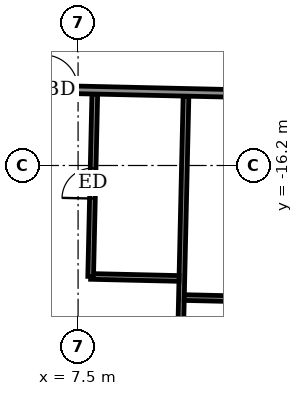
"""IFC4 building model, lengths in metres.
Left out: names, types, materials, properties, quantities, classifications, styles, units other than length and angle.
Written with IfcOpenShell. Run it as: python <this file> out.ifc"""

import sys

from ifc_helpers import new_model, si_unit, direction, frame, frame_2d, origin, place, context, subcontext, project, spatial, rectangle, extrude, element, fill, save


model = new_model("IFC4")
c1 = context("Model", 3, precision=1e-05, world=origin(), true_north=direction((0.0, 1.0)))
c2 = subcontext(c1, "Body", "Model", "MODEL_VIEW")
j1 = project(units=[si_unit("LENGTHUNIT", "METRE"), si_unit("PLANEANGLEUNIT", "RADIAN")], contexts=[c1])
p1 = place(None, origin())
s1 = spatial("IfcSite", under=j1, at=p1, CompositionType="ELEMENT")
p2 = place(p1, origin())
s2 = spatial("IfcBuilding", under=s1, at=p2, CompositionType="ELEMENT")
p3 = place(p2, frame((0.0, 0.0, 306.1)))
s3 = spatial("IfcBuildingStorey", under=s2, at=p3, CompositionType="ELEMENT", Elevation=306.1)
p4 = place(p3, frame((10.08, -25.822, 0.0), z_axis=(0.0, 0.0, 1.0), x_axis=(0.022708327922, 0.999742132674, 0.0)))
e1 = element("IfcWall", 1, at=p4, inside=s3, PredefinedType="PARTITIONING", context=c2, shape_type="SweptSolid", body=[
    extrude(rectangle(XDim=11.45, YDim=0.15, at=frame_2d((5.725, 0.0))), origin(), (0.0, 0.0, 1.0), 2.5),
])
for number, where, z_axis, x_axis in (
    (2, (10.294, -19.675, 0.0), (0.0, 0.0, 1.0), (1.0, -0.023, 0.0)),
    (3, (7.831, -19.119, 0.0), (0.0, 0.0, 1.0), (1.0, -0.023, 0.0)),
):
    element("IfcWall", number, at=place(p3, frame(where, z_axis=z_axis, x_axis=x_axis)), inside=s3, PredefinedType="PARTITIONING", context=c2, shape_type="SweptSolid", body=[
        extrude(rectangle(XDim=2.325, YDim=0.15, at=frame_2d((1.163, 0.0))), origin(), (0.0, 0.0, 1.0), 3.05),
    ])
p5 = place(p3, frame((7.831, -19.119, 0.0), z_axis=(0.0, 0.0, 1.0), x_axis=(0.022689048768, 0.999742570398, 0.0)))
e4 = element("IfcWall", 4, at=p5, inside=s3, PredefinedType="PARTITIONING", context=c2, shape_type="SweptSolid", body=[
    extrude(rectangle(XDim=4.799, YDim=0.15, at=frame_2d((2.399, 0.0))), origin(), (0.0, 0.0, 1.0), 3.05),
])
p6 = place(p5, frame((2.05, 0.0, 0.0)))
e5 = element("IfcOpeningElement", 5, at=p6, cuts=e4, PredefinedType="OPENING", context=c2, shape_type="SweptSolid", body=[
    extrude(rectangle(XDim=0.8, YDim=2.1, at=frame_2d((0.4, 1.05))), frame((0.0, 0.085, 0.0), z_axis=(0.0, -1.0, 0.0), x_axis=(1.0, 0.0, 0.0)), (0.0, 0.0, 1.0), 0.17),
])
p7 = place(p3, frame((-31.347, -13.329, 0.0), z_axis=(0.0, 0.0, 1.0), x_axis=(0.999742613079, -0.022687168058, 0.0)))
e6 = element("IfcWall", 6, at=p7, inside=s3, PredefinedType="PARTITIONING", context=c2, shape_type="SweptSolid", body=[
    extrude(rectangle(XDim=58.799, YDim=0.2, at=frame_2d((29.399, 0.0))), origin(), (0.0, 0.0, 1.0), 3.05),
])
p8 = place(p7, frame((1.35, 0.0, 0.0)))
e7 = element("IfcOpeningElement", 7, at=p8, cuts=e6, PredefinedType="OPENING", context=c2, shape_type="SweptSolid", body=[
    extrude(rectangle(XDim=1.0, YDim=2.1, at=frame_2d((0.5, 1.05))), frame((0.0, 0.11, 0.0), z_axis=(0.0, -1.0, 0.0), x_axis=(1.0, 0.0, 0.0)), (0.0, 0.0, 1.0), 0.22),
])
p9 = place(p7, frame((5.95, 0.0, 0.0)))
e8 = element("IfcOpeningElement", 8, at=p9, cuts=e6, PredefinedType="OPENING", context=c2, shape_type="SweptSolid", body=[
    extrude(rectangle(XDim=0.9, YDim=2.1, at=frame_2d((0.45, 1.05))), frame((0.0, 0.11, 0.0), z_axis=(0.0, -1.0, 0.0), x_axis=(1.0, 0.0, 0.0)), (0.0, 0.0, 1.0), 0.22),
])
p10 = place(p7, frame((10.575, 0.0, 0.0)))
e9 = element("IfcOpeningElement", 9, at=p10, cuts=e6, PredefinedType="OPENING", context=c2, shape_type="SweptSolid", body=[
    extrude(rectangle(XDim=0.9, YDim=2.1, at=frame_2d((0.45, 1.05))), frame((0.0, 0.11, 0.0), z_axis=(0.0, -1.0, 0.0), x_axis=(1.0, 0.0, 0.0)), (0.0, 0.0, 1.0), 0.22),
])
p11 = place(p7, frame((12.425, 0.0, 0.0)))
e10 = element("IfcOpeningElement", 10, at=p11, cuts=e6, PredefinedType="OPENING", context=c2, shape_type="SweptSolid", body=[
    extrude(rectangle(XDim=0.9, YDim=2.1, at=frame_2d((0.45, 1.05))), frame((0.0, 0.11, 0.0), z_axis=(0.0, -1.0, 0.0), x_axis=(1.0, 0.0, 0.0)), (0.0, 0.0, 1.0), 0.22),
])
p12 = place(p7, frame((19.075, 0.0, 0.0)))
e11 = element("IfcOpeningElement", 11, at=p12, cuts=e6, PredefinedType="OPENING", context=c2, shape_type="SweptSolid", body=[
    extrude(rectangle(XDim=0.9, YDim=2.1, at=frame_2d((0.45, 1.05))), frame((0.0, 0.11, 0.0), z_axis=(0.0, -1.0, 0.0), x_axis=(1.0, 0.0, 0.0)), (0.0, 0.0, 1.0), 0.22),
])
p13 = place(p7, frame((20.95, 0.0, 0.0)))
e12 = element("IfcOpeningElement", 12, at=p13, cuts=e6, PredefinedType="OPENING", context=c2, shape_type="SweptSolid", body=[
    extrude(rectangle(XDim=0.9, YDim=2.1, at=frame_2d((0.45, 1.05))), frame((0.0, 0.11, 0.0), z_axis=(0.0, -1.0, 0.0), x_axis=(1.0, 0.0, 0.0)), (0.0, 0.0, 1.0), 0.22),
])
p14 = place(p7, frame((27.625, 0.0, 0.0)))
e13 = element("IfcOpeningElement", 13, at=p14, cuts=e6, PredefinedType="OPENING", context=c2, shape_type="SweptSolid", body=[
    extrude(rectangle(XDim=0.9, YDim=2.1, at=frame_2d((0.45, 1.05))), frame((0.0, 0.11, 0.0), z_axis=(0.0, -1.0, 0.0), x_axis=(1.0, 0.0, 0.0)), (0.0, 0.0, 1.0), 0.22),
])
p15 = place(p7, frame((29.475, 0.0, 0.0)))
e14 = element("IfcOpeningElement", 14, at=p15, cuts=e6, PredefinedType="OPENING", context=c2, shape_type="SweptSolid", body=[
    extrude(rectangle(XDim=0.9, YDim=2.1, at=frame_2d((0.45, 1.05))), frame((0.0, 0.11, 0.0), z_axis=(0.0, -1.0, 0.0), x_axis=(1.0, 0.0, 0.0)), (0.0, 0.0, 1.0), 0.22),
])
p16 = place(p7, frame((36.125, 0.0, 0.0)))
e15 = element("IfcOpeningElement", 15, at=p16, cuts=e6, PredefinedType="OPENING", context=c2, shape_type="SweptSolid", body=[
    extrude(rectangle(XDim=0.9, YDim=2.1, at=frame_2d((0.45, 1.05))), frame((0.0, 0.11, 0.0), z_axis=(0.0, -1.0, 0.0), x_axis=(1.0, 0.0, 0.0)), (0.0, 0.0, 1.0), 0.22),
])
p17 = place(p7, frame((37.95, 0.0, 0.0)))
e16 = element("IfcOpeningElement", 16, at=p17, cuts=e6, PredefinedType="OPENING", context=c2, shape_type="SweptSolid", body=[
    extrude(rectangle(XDim=0.9, YDim=2.1, at=frame_2d((0.45, 1.05))), frame((0.0, 0.11, 0.0), z_axis=(0.0, -1.0, 0.0), x_axis=(1.0, 0.0, 0.0)), (0.0, 0.0, 1.0), 0.22),
])
p18 = place(p7, frame((44.6, 0.0, 0.0)))
e17 = element("IfcOpeningElement", 17, at=p18, cuts=e6, PredefinedType="OPENING", context=c2, shape_type="SweptSolid", body=[
    extrude(rectangle(XDim=0.9, YDim=2.1, at=frame_2d((0.45, 1.05))), frame((0.0, 0.11, 0.0), z_axis=(0.0, -1.0, 0.0), x_axis=(1.0, 0.0, 0.0)), (0.0, 0.0, 1.0), 0.22),
])
p19 = place(p7, frame((46.475, 0.0, 0.0)))
e18 = element("IfcOpeningElement", 18, at=p19, cuts=e6, PredefinedType="OPENING", context=c2, shape_type="SweptSolid", body=[
    extrude(rectangle(XDim=0.9, YDim=2.1, at=frame_2d((0.45, 1.05))), frame((0.0, 0.11, 0.0), z_axis=(0.0, -1.0, 0.0), x_axis=(1.0, 0.0, 0.0)), (0.0, 0.0, 1.0), 0.22),
])
p20 = place(p7, frame((55.925, 0.0, 0.0)))
e19 = element("IfcOpeningElement", 19, at=p20, cuts=e6, PredefinedType="OPENING", context=c2, shape_type="SweptSolid", body=[
    extrude(rectangle(XDim=1.0, YDim=2.1, at=frame_2d((0.5, 1.05))), frame((0.0, 0.11, 0.0), z_axis=(0.0, -1.0, 0.0), x_axis=(1.0, 0.0, 0.0)), (0.0, 0.0, 1.0), 0.22),
])
p21 = place(p7, frame((51.0, 0.0, 0.0)))
e20 = element("IfcOpeningElement", 20, at=p21, cuts=e6, PredefinedType="OPENING", context=c2, shape_type="SweptSolid", body=[
    extrude(rectangle(XDim=0.9, YDim=2.1, at=frame_2d((0.45, 1.05))), frame((0.0, 0.11, 0.0), z_axis=(0.0, -1.0, 0.0), x_axis=(1.0, 0.0, 0.0)), (0.0, 0.0, 1.0), 0.22),
])
p22 = place(p17, origin())
e21 = element("IfcDoor", 21, at=p22, inside=s3, OperationType="SINGLE_SWING_RIGHT", PredefinedType="DOOR", context=c2, shape_type="SweptSolid", body=[
    extrude(rectangle(XDim=0.9, YDim=2.1, at=frame_2d((0.45, 1.05))), frame((0.0, 0.025, 0.0), z_axis=(0.0, -1.0, 0.0), x_axis=(1.0, 0.0, 0.0)), (0.0, 0.0, 1.0), 0.05),
])
fill(e16, e21)
p23 = place(p6, origin())
e22 = element("IfcDoor", 22, at=p23, inside=s3, OperationType="SINGLE_SWING_RIGHT", PredefinedType="DOOR", context=c2, shape_type="SweptSolid", body=[
    extrude(rectangle(XDim=0.8, YDim=2.1, at=frame_2d((0.4, 1.05))), frame((0.0, 0.025, 0.0), z_axis=(0.0, -1.0, 0.0), x_axis=(1.0, 0.0, 0.0)), (0.0, 0.0, 1.0), 0.05),
])
fill(e5, e22)
save(model, sys.argv[1])
